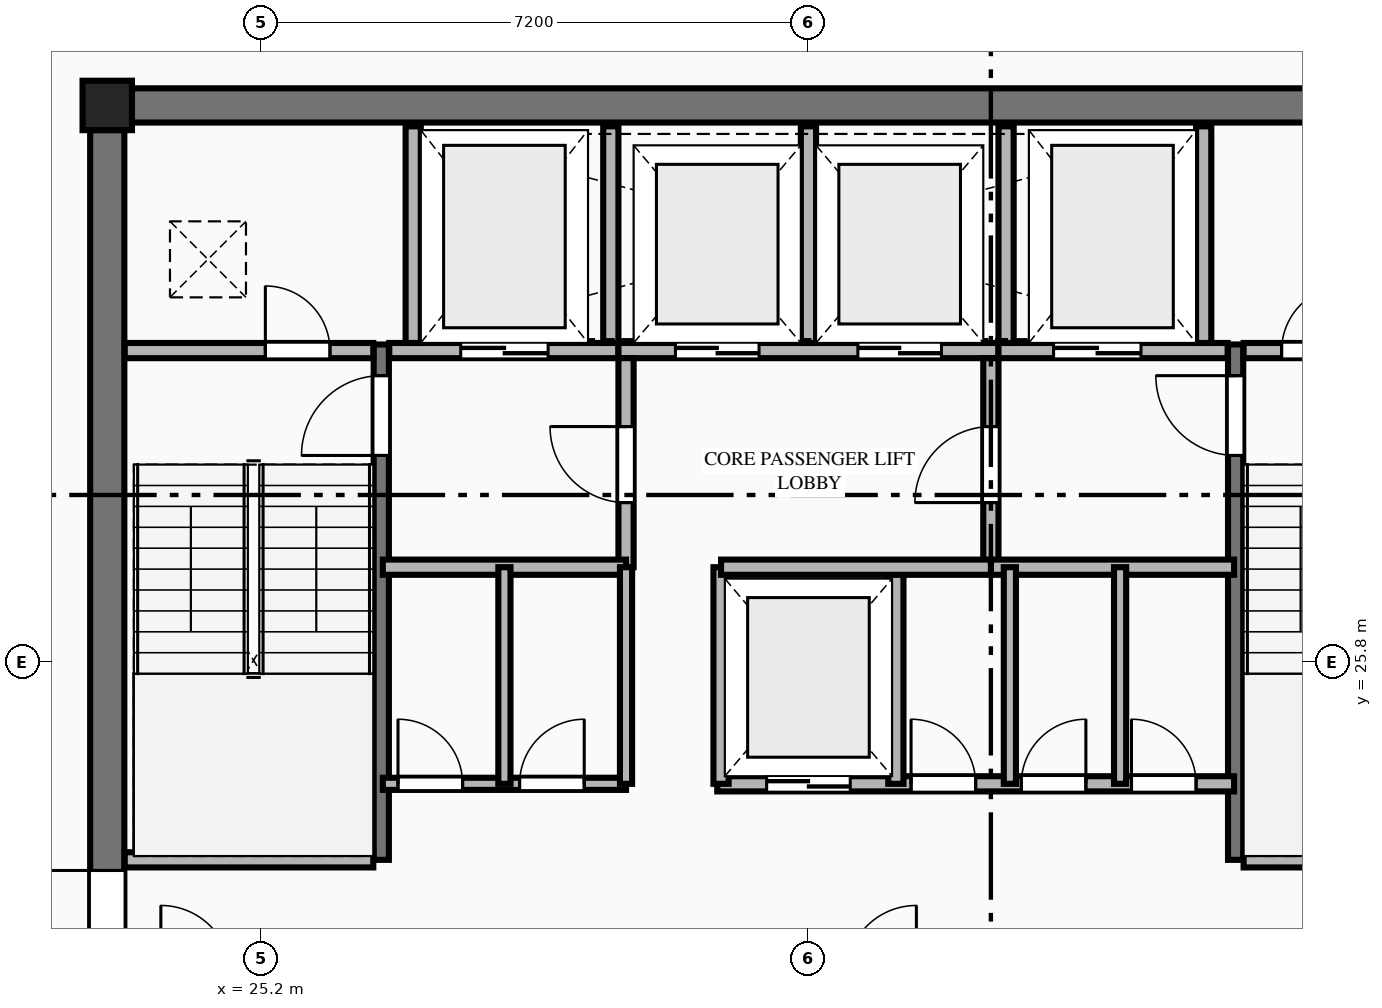
"""IFC4 building model, lengths in metres.
Left out: names, types, materials, properties, quantities, classifications, styles, units other than length and angle.
Written with IfcOpenShell. Run it as: python <this file> out.ifc"""

import sys

from ifc_helpers import new_model, si_unit, direction, frame, frame_2d, origin, origin_2d, place, context, subcontext, project, spatial, rectangle, extrude, element, fill, save


model = new_model("IFC4")
c1 = context("Model", 3, precision=1e-05, world=origin(), true_north=direction((0.0, 1.0)))
c2 = subcontext(c1, "Body", "Model", "MODEL_VIEW")
j1 = project(units=[si_unit("LENGTHUNIT", "METRE"), si_unit("PLANEANGLEUNIT", "RADIAN")], contexts=[c1])
p1 = place(None, origin())
s1 = spatial("IfcSite", under=j1, at=p1, CompositionType="ELEMENT")
p2 = place(p1, origin())
s2 = spatial("IfcBuilding", under=s1, at=p2, CompositionType="ELEMENT")
p3 = place(p2, frame((0.0, 0.0, 270.8)))
s3 = spatial("IfcBuildingStorey", under=s2, at=p3, CompositionType="ELEMENT", Elevation=270.8)
p4 = place(p3, frame((23.175, 33.125, 0.0), z_axis=(0.0, 0.0, 1.0), x_axis=(1.0, 0.0, 0.0)))
e1 = element("IfcColumn", 1, at=p4, inside=s3, PredefinedType="COLUMN", context=c2, shape_type="SweptSolid", body=[
    extrude(rectangle(XDim=0.65, YDim=0.65, at=origin_2d()), origin(), (0.0, 0.0, 1.0), 3.65),
])
p5 = place(p3, frame((23.5, 33.125, 0.0), z_axis=(0.0, 0.0, 1.0), x_axis=(1.0, 0.0, 0.0)))
e2 = element("IfcWall", 2, at=p5, inside=s3, PredefinedType="SHEAR", context=c2, shape_type="SweptSolid", body=[
    extrude(rectangle(XDim=17.8, YDim=0.45, at=frame_2d((8.9, 0.0))), origin(), (0.0, 0.0, 1.0), 3.45),
])
p6 = place(p3, frame((23.175, 19.0, 0.0), z_axis=(0.0, 0.0, 1.0), x_axis=(0.0, 1.0, 0.0)))
e3 = element("IfcWall", 3, at=p6, inside=s3, PredefinedType="SHEAR", context=c2, shape_type="SweptSolid", body=[
    extrude(rectangle(XDim=13.8, YDim=0.45, at=frame_2d((6.9, 0.0))), origin(), (0.0, 0.0, 1.0), 3.45),
])
p7 = place(p6, frame((2.84, 0.0, 0.0)))
e4 = element("IfcOpeningElement", 4, at=p7, cuts=e3, PredefinedType="OPENING", context=c2, shape_type="SweptSolid", body=[
    extrude(rectangle(XDim=1.22, YDim=2.25, at=frame_2d((0.61, 1.125))), frame((0.0, 0.235, 0.0), z_axis=(0.0, -1.0, 0.0), x_axis=(1.0, 0.0, 0.0)), (0.0, 0.0, 1.0), 0.47),
])
p8 = place(p3, frame((26.78, 23.2, 0.0), z_axis=(0.0, 0.0, 1.0), x_axis=(0.0, 1.0, 0.0)))
e5 = element("IfcWall", 5, at=p8, inside=s3, PredefinedType="SHEAR", context=c2, shape_type="SweptSolid", body=[
    extrude(rectangle(XDim=6.78, YDim=0.2, at=frame_2d((3.39, 0.0))), origin(), (0.0, 0.0, 1.0), 3.65),
])
p9 = place(p8, frame((5.32, 0.0, 0.0)))
e6 = element("IfcOpeningElement", 6, at=p9, cuts=e5, PredefinedType="OPENING", context=c2, shape_type="SweptSolid", body=[
    extrude(rectangle(XDim=1.05, YDim=2.15, at=frame_2d((0.525, 1.075))), frame((0.0, 0.11, 0.0), z_axis=(0.0, -1.0, 0.0), x_axis=(1.0, 0.0, 0.0)), (0.0, 0.0, 1.0), 0.22),
])
p10 = place(p3, frame((23.405, 23.2, 0.0), z_axis=(0.0, 0.0, 1.0), x_axis=(1.0, 0.0, 0.0)))
e7 = element("IfcWall", 7, at=p10, inside=s3, PredefinedType="PLUMBINGWALL", context=c2, shape_type="SweptSolid", body=[
    extrude(rectangle(XDim=3.27, YDim=0.2, at=frame_2d((1.635, 0.0))), origin(), (0.0, 0.0, 1.0), 3.45),
])
p11 = place(p3, frame((38.02, 23.2, 0.0), z_axis=(0.0, 0.0, 1.0), x_axis=(0.0, 1.0, 0.0)))
e8 = element("IfcWall", 8, at=p11, inside=s3, PredefinedType="SHEAR", context=c2, shape_type="SweptSolid", body=[
    extrude(rectangle(XDim=6.78, YDim=0.2, at=frame_2d((3.39, 0.0))), origin(), (0.0, 0.0, 1.0), 3.65),
])
p12 = place(p11, frame((5.32, 0.0, 0.0)))
e9 = element("IfcOpeningElement", 9, at=p12, cuts=e8, PredefinedType="OPENING", context=c2, shape_type="SweptSolid", body=[
    extrude(rectangle(XDim=1.05, YDim=2.15, at=frame_2d((0.525, 1.075))), frame((0.0, 0.11, 0.0), z_axis=(0.0, -1.0, 0.0), x_axis=(1.0, 0.0, 0.0)), (0.0, 0.0, 1.0), 0.22),
])
p13 = place(p3, frame((38.125, 23.2, 0.0), z_axis=(0.0, 0.0, 1.0), x_axis=(1.0, 0.0, 0.0)))
e10 = element("IfcWall", 10, at=p13, inside=s3, PredefinedType="PLUMBINGWALL", context=c2, shape_type="SweptSolid", body=[
    extrude(rectangle(XDim=3.27, YDim=0.2, at=frame_2d((1.635, 0.0))), origin(), (0.0, 0.0, 1.0), 3.45),
])
p14 = place(p3, frame((23.405, 29.9, 0.0), z_axis=(0.0, 0.0, 1.0), x_axis=(1.0, 0.0, 0.0)))
e11 = element("IfcWall", 11, at=p14, inside=s3, PredefinedType="PLUMBINGWALL", context=c2, shape_type="SweptSolid", body=[
    extrude(rectangle(XDim=3.27, YDim=0.2, at=frame_2d((1.635, 0.0))), origin(), (0.0, 0.0, 1.0), 3.45),
])
p15 = place(p14, frame((1.85, 0.0, 0.0)))
e12 = element("IfcOpeningElement", 12, at=p15, cuts=e11, PredefinedType="OPENING", context=c2, shape_type="SweptSolid", body=[
    extrude(rectangle(XDim=0.85, YDim=2.05, at=frame_2d((0.425, 1.025))), frame((0.0, 0.11, 0.0), z_axis=(0.0, -1.0, 0.0), x_axis=(1.0, 0.0, 0.0)), (0.0, 0.0, 1.0), 0.22),
])
p16 = place(p3, frame((26.885, 29.9, 0.0), z_axis=(0.0, 0.0, 1.0), x_axis=(1.0, 0.0, 0.0)))
e13 = element("IfcWall", 13, at=p16, inside=s3, PredefinedType="PLUMBINGWALL", context=c2, shape_type="SweptSolid", body=[
    extrude(rectangle(XDim=3.015, YDim=0.2, at=frame_2d((1.507, 0.0))), origin(), (0.0, 0.0, 1.0), 3.45),
])
p17 = place(p16, frame((0.94, 0.0, 0.0)))
e14 = element("IfcOpeningElement", 14, at=p17, cuts=e13, PredefinedType="OPENING", context=c2, shape_type="SweptSolid", body=[
    extrude(rectangle(XDim=1.15, YDim=2.2, at=frame_2d((0.575, 1.1))), frame((0.0, 0.11, 0.0), z_axis=(0.0, -1.0, 0.0), x_axis=(1.0, 0.0, 0.0)), (0.0, 0.0, 1.0), 0.22),
])
p18 = place(p3, frame((29.9, 29.9, 0.0), z_axis=(0.0, 0.0, 1.0), x_axis=(1.0, 0.0, 0.0)))
e15 = element("IfcWall", 15, at=p18, inside=s3, PredefinedType="PLUMBINGWALL", context=c2, shape_type="SweptSolid", body=[
    extrude(rectangle(XDim=5.0, YDim=0.2, at=frame_2d((2.5, 0.0))), origin(), (0.0, 0.0, 1.0), 3.45),
])
p19 = place(p18, frame((0.75, 0.0, 0.0)))
e16 = element("IfcOpeningElement", 16, at=p19, cuts=e15, PredefinedType="OPENING", context=c2, shape_type="SweptSolid", body=[
    extrude(rectangle(XDim=1.1, YDim=2.2, at=frame_2d((0.55, 1.1))), frame((0.0, 0.11, 0.0), z_axis=(0.0, -1.0, 0.0), x_axis=(1.0, 0.0, 0.0)), (0.0, 0.0, 1.0), 0.22),
])
p20 = place(p18, frame((3.15, 0.0, 0.0)))
e17 = element("IfcOpeningElement", 17, at=p20, cuts=e15, PredefinedType="OPENING", context=c2, shape_type="SweptSolid", body=[
    extrude(rectangle(XDim=1.1, YDim=2.2, at=frame_2d((0.55, 1.1))), frame((0.0, 0.11, 0.0), z_axis=(0.0, -1.0, 0.0), x_axis=(1.0, 0.0, 0.0)), (0.0, 0.0, 1.0), 0.22),
])
p21 = place(p3, frame((34.9, 29.9, 0.0), z_axis=(0.0, 0.0, 1.0), x_axis=(1.0, 0.0, 0.0)))
e18 = element("IfcWall", 18, at=p21, inside=s3, PredefinedType="PLUMBINGWALL", context=c2, shape_type="SweptSolid", body=[
    extrude(rectangle(XDim=3.015, YDim=0.2, at=frame_2d((1.508, 0.0))), origin(), (0.0, 0.0, 1.0), 3.45),
])
p22 = place(p21, frame((0.725, 0.0, 0.0)))
e19 = element("IfcOpeningElement", 19, at=p22, cuts=e18, PredefinedType="OPENING", context=c2, shape_type="SweptSolid", body=[
    extrude(rectangle(XDim=1.15, YDim=2.2, at=frame_2d((0.575, 1.1))), frame((0.0, 0.11, 0.0), z_axis=(0.0, -1.0, 0.0), x_axis=(1.0, 0.0, 0.0)), (0.0, 0.0, 1.0), 0.22),
])
p23 = place(p3, frame((38.125, 29.9, 0.0), z_axis=(0.0, 0.0, 1.0), x_axis=(1.0, 0.0, 0.0)))
e20 = element("IfcWall", 20, at=p23, inside=s3, PredefinedType="PLUMBINGWALL", context=c2, shape_type="SweptSolid", body=[
    extrude(rectangle(XDim=3.27, YDim=0.2, at=frame_2d((1.635, 0.0))), origin(), (0.0, 0.0, 1.0), 3.45),
])
p24 = place(p23, frame((0.5, 0.0, 0.0)))
e21 = element("IfcOpeningElement", 21, at=p24, cuts=e20, PredefinedType="OPENING", context=c2, shape_type="SweptSolid", body=[
    extrude(rectangle(XDim=0.85, YDim=2.05, at=frame_2d((0.425, 1.025))), frame((0.0, 0.11, 0.0), z_axis=(0.0, -1.0, 0.0), x_axis=(1.0, 0.0, 0.0)), (0.0, 0.0, 1.0), 0.22),
])
for number, where, z_axis, x_axis in (
    (22, (27.2, 30.0, 0.0), (0.0, 0.0, 1.0), (0.0, 1.0, 0.0)),
    (23, (29.8, 30.0, 0.0), (0.0, 0.0, 1.0), (0.0, 1.0, 0.0)),
    (24, (32.4, 30.0, 0.0), (0.0, 0.0, 1.0), (0.0, 1.0, 0.0)),
    (25, (35.0, 30.0, 0.0), (0.0, 0.0, 1.0), (0.0, 1.0, 0.0)),
    (26, (37.6, 30.0, 0.0), (0.0, 0.0, 1.0), (0.0, 1.0, 0.0)),
):
    element("IfcWall", number, at=place(p3, frame(where, z_axis=z_axis, x_axis=x_axis)), inside=s3, PredefinedType="PLUMBINGWALL", context=c2, shape_type="SweptSolid", body=[
        extrude(rectangle(XDim=2.85, YDim=0.2, at=frame_2d((1.425, 0.0))), origin(), (0.0, 0.0, 1.0), 3.45),
    ])
p25 = place(p3, frame((30.0, 27.05, 0.0), z_axis=(0.0, 0.0, 1.0), x_axis=(0.0, 1.0, 0.0)))
e27 = element("IfcWall", 27, at=p25, inside=s3, PredefinedType="PLUMBINGWALL", context=c2, shape_type="SweptSolid", body=[
    extrude(rectangle(XDim=2.75, YDim=0.2, at=frame_2d((1.375, 0.0))), origin(), (0.0, 0.0, 1.0), 3.45),
])
p26 = place(p25, frame((0.85, 0.0, 0.0)))
e28 = element("IfcOpeningElement", 28, at=p26, cuts=e27, PredefinedType="OPENING", context=c2, shape_type="SweptSolid", body=[
    extrude(rectangle(XDim=1.0, YDim=2.15, at=frame_2d((0.5, 1.075))), frame((0.0, 0.11, 0.0), z_axis=(0.0, -1.0, 0.0), x_axis=(1.0, 0.0, 0.0)), (0.0, 0.0, 1.0), 0.22),
])
p27 = place(p3, frame((26.8, 27.05, 0.0), z_axis=(0.0, 0.0, 1.0), x_axis=(1.0, 0.0, 0.0)))
e29 = element("IfcWall", 29, at=p27, inside=s3, PredefinedType="PLUMBINGWALL", context=c2, shape_type="SweptSolid", body=[
    extrude(rectangle(XDim=3.2, YDim=0.2, at=frame_2d((1.6, 0.0))), origin(), (0.0, 0.0, 1.0), 3.45),
])
p28 = place(p3, frame((34.8, 27.05, 0.0), z_axis=(0.0, 0.0, 1.0), x_axis=(0.0, 1.0, 0.0)))
e30 = element("IfcWall", 30, at=p28, inside=s3, PredefinedType="PLUMBINGWALL", context=c2, shape_type="SweptSolid", body=[
    extrude(rectangle(XDim=2.75, YDim=0.2, at=frame_2d((1.375, 0.0))), origin(), (0.0, 0.0, 1.0), 3.45),
])
p29 = place(p28, frame((0.85, 0.0, 0.0)))
e31 = element("IfcOpeningElement", 31, at=p29, cuts=e30, PredefinedType="OPENING", context=c2, shape_type="SweptSolid", body=[
    extrude(rectangle(XDim=1.0, YDim=2.15, at=frame_2d((0.5, 1.075))), frame((0.0, 0.11, 0.0), z_axis=(0.0, -1.0, 0.0), x_axis=(1.0, 0.0, 0.0)), (0.0, 0.0, 1.0), 0.22),
])
p30 = place(p3, frame((34.8, 27.05, 0.0), z_axis=(0.0, 0.0, 1.0), x_axis=(1.0, 0.0, 0.0)))
e32 = element("IfcWall", 32, at=p30, inside=s3, PredefinedType="PLUMBINGWALL", context=c2, shape_type="SweptSolid", body=[
    extrude(rectangle(XDim=3.2, YDim=0.2, at=frame_2d((1.6, 0.0))), origin(), (0.0, 0.0, 1.0), 3.45),
])
p31 = place(p3, frame((26.8, 24.2, 0.0), z_axis=(0.0, 0.0, 1.0), x_axis=(1.0, 0.0, 0.0)))
e33 = element("IfcWall", 33, at=p31, inside=s3, PredefinedType="PARTITIONING", context=c2, shape_type="SweptSolid", body=[
    extrude(rectangle(XDim=3.2, YDim=0.16, at=frame_2d((1.6, 0.0))), origin(), (0.0, 0.0, 1.0), 3.45),
])
p32 = place(p31, frame((0.2, 0.0, 0.0)))
e34 = element("IfcOpeningElement", 34, at=p32, cuts=e33, PredefinedType="OPENING", context=c2, shape_type="SweptSolid", body=[
    extrude(rectangle(XDim=0.85, YDim=2.05, at=frame_2d((0.425, 1.025))), frame((0.0, 0.09, 0.0), z_axis=(0.0, -1.0, 0.0), x_axis=(1.0, 0.0, 0.0)), (0.0, 0.0, 1.0), 0.18),
])
p33 = place(p31, frame((1.8, 0.0, 0.0)))
e35 = element("IfcOpeningElement", 35, at=p33, cuts=e33, PredefinedType="OPENING", context=c2, shape_type="SweptSolid", body=[
    extrude(rectangle(XDim=0.85, YDim=2.05, at=frame_2d((0.425, 1.025))), frame((0.0, 0.09, 0.0), z_axis=(0.0, -1.0, 0.0), x_axis=(1.0, 0.0, 0.0)), (0.0, 0.0, 1.0), 0.18),
])
p34 = place(p3, frame((30.0, 24.2, 0.0), z_axis=(0.0, 0.0, 1.0), x_axis=(0.0, 1.0, 0.0)))
e36 = element("IfcWall", 36, at=p34, inside=s3, PredefinedType="PARTITIONING", context=c2, shape_type="SweptSolid", body=[
    extrude(rectangle(XDim=2.85, YDim=0.16, at=frame_2d((1.425, 0.0))), origin(), (0.0, 0.0, 1.0), 3.45),
])
p35 = place(p3, frame((31.2, 24.2, 0.0), z_axis=(0.0, 0.0, 1.0), x_axis=(1.0, 0.0, 0.0)))
e37 = element("IfcWall", 37, at=p35, inside=s3, PredefinedType="PLUMBINGWALL", context=c2, shape_type="SweptSolid", body=[
    extrude(rectangle(XDim=6.8, YDim=0.2, at=frame_2d((3.4, 0.0))), origin(), (0.0, 0.0, 1.0), 3.45),
])
p36 = place(p35, frame((0.65, 0.0, 0.0)))
e38 = element("IfcOpeningElement", 38, at=p36, cuts=e37, PredefinedType="OPENING", context=c2, shape_type="SweptSolid", body=[
    extrude(rectangle(XDim=1.1, YDim=2.2, at=frame_2d((0.55, 1.1))), frame((0.0, 0.11, 0.0), z_axis=(0.0, -1.0, 0.0), x_axis=(1.0, 0.0, 0.0)), (0.0, 0.0, 1.0), 0.22),
])
p37 = place(p35, frame((2.55, 0.0, 0.0)))
e39 = element("IfcOpeningElement", 39, at=p37, cuts=e37, PredefinedType="OPENING", context=c2, shape_type="SweptSolid", body=[
    extrude(rectangle(XDim=0.85, YDim=2.05, at=frame_2d((0.425, 1.025))), frame((0.0, 0.11, 0.0), z_axis=(0.0, -1.0, 0.0), x_axis=(1.0, 0.0, 0.0)), (0.0, 0.0, 1.0), 0.22),
])
p38 = place(p35, frame((4.0, 0.0, 0.0)))
e40 = element("IfcOpeningElement", 40, at=p38, cuts=e37, PredefinedType="OPENING", context=c2, shape_type="SweptSolid", body=[
    extrude(rectangle(XDim=0.85, YDim=2.05, at=frame_2d((0.425, 1.025))), frame((0.0, 0.11, 0.0), z_axis=(0.0, -1.0, 0.0), x_axis=(1.0, 0.0, 0.0)), (0.0, 0.0, 1.0), 0.22),
])
p39 = place(p35, frame((5.45, 0.0, 0.0)))
e41 = element("IfcOpeningElement", 41, at=p39, cuts=e37, PredefinedType="OPENING", context=c2, shape_type="SweptSolid", body=[
    extrude(rectangle(XDim=0.85, YDim=2.05, at=frame_2d((0.425, 1.025))), frame((0.0, 0.11, 0.0), z_axis=(0.0, -1.0, 0.0), x_axis=(1.0, 0.0, 0.0)), (0.0, 0.0, 1.0), 0.22),
])
for number, where, z_axis, x_axis in (
    (42, (31.25, 24.2, 0.0), (0.0, 0.0, 1.0), (0.0, 1.0, 0.0)),
    (43, (33.55, 24.2, 0.0), (0.0, 0.0, 1.0), (0.0, 1.0, 0.0)),
):
    element("IfcWall", number, at=place(p3, frame(where, z_axis=z_axis, x_axis=x_axis)), inside=s3, PredefinedType="PLUMBINGWALL", context=c2, shape_type="SweptSolid", body=[
        extrude(rectangle(XDim=2.85, YDim=0.2, at=frame_2d((1.425, 0.0))), origin(), (0.0, 0.0, 1.0), 3.45),
    ])
p40 = place(p3, frame((31.25, 27.05, 0.0), z_axis=(0.0, 0.0, 1.0), x_axis=(1.0, 0.0, 0.0)))
e44 = element("IfcWall", 44, at=p40, inside=s3, PredefinedType="PLUMBINGWALL", context=c2, shape_type="SweptSolid", body=[
    extrude(rectangle(XDim=3.55, YDim=0.2, at=frame_2d((1.775, 0.0))), origin(), (0.0, 0.0, 1.0), 3.45),
])
for number, where, z_axis, x_axis in (
    (45, (28.4, 24.2, 0.0), (0.0, 0.0, 1.0), (0.0, 1.0, 0.0)),
    (46, (35.05, 24.2, 0.0), (0.0, 0.0, 1.0), (0.0, 1.0, 0.0)),
    (47, (36.5, 24.2, 0.0), (0.0, 0.0, 1.0), (0.0, 1.0, 0.0)),
):
    element("IfcWall", number, at=place(p3, frame(where, z_axis=z_axis, x_axis=x_axis)), inside=s3, PredefinedType="PARTITIONING", context=c2, shape_type="SweptSolid", body=[
        extrude(rectangle(XDim=2.85, YDim=0.16, at=frame_2d((1.425, 0.0))), origin(), (0.0, 0.0, 1.0), 3.45),
    ])
p41 = place(p7, origin())
e48 = element("IfcDoor", 48, at=p41, inside=s3, OperationType="SINGLE_SWING_RIGHT", PredefinedType="DOOR", context=c2, shape_type="SweptSolid", body=[
    extrude(rectangle(XDim=1.22, YDim=2.25, at=frame_2d((0.61, 1.125))), frame((0.0, 0.025, 0.0), z_axis=(0.0, -1.0, 0.0), x_axis=(1.0, 0.0, 0.0)), (0.0, 0.0, 1.0), 0.05),
])
fill(e4, e48)
p42 = place(p9, origin())
e49 = element("IfcDoor", 49, at=p42, inside=s3, OperationType="SINGLE_SWING_LEFT", PredefinedType="DOOR", context=c2, shape_type="SweptSolid", body=[
    extrude(rectangle(XDim=1.05, YDim=2.15, at=frame_2d((0.525, 1.075))), frame((0.0, 0.025, 0.0), z_axis=(0.0, -1.0, 0.0), x_axis=(1.0, 0.0, 0.0)), (0.0, 0.0, 1.0), 0.05),
])
fill(e6, e49)
p43 = place(p12, origin())
e50 = element("IfcDoor", 50, at=p43, inside=s3, OperationType="SINGLE_SWING_RIGHT", PredefinedType="DOOR", context=c2, shape_type="SweptSolid", body=[
    extrude(rectangle(XDim=1.05, YDim=2.15, at=frame_2d((0.525, 1.075))), frame((0.0, 0.025, 0.0), z_axis=(0.0, -1.0, 0.0), x_axis=(1.0, 0.0, 0.0)), (0.0, 0.0, 1.0), 0.05),
])
fill(e9, e50)
p44 = place(p15, origin())
e51 = element("IfcDoor", 51, at=p44, inside=s3, OperationType="SINGLE_SWING_LEFT", PredefinedType="DOOR", context=c2, shape_type="SweptSolid", body=[
    extrude(rectangle(XDim=0.85, YDim=2.05, at=frame_2d((0.425, 1.025))), frame((0.0, 0.025, 0.0), z_axis=(0.0, -1.0, 0.0), x_axis=(1.0, 0.0, 0.0)), (0.0, 0.0, 1.0), 0.05),
])
fill(e12, e51)
p45 = place(p24, origin())
e52 = element("IfcDoor", 52, at=p45, inside=s3, OperationType="SINGLE_SWING_RIGHT", PredefinedType="DOOR", context=c2, shape_type="SweptSolid", body=[
    extrude(rectangle(XDim=0.85, YDim=2.05, at=frame_2d((0.425, 1.025))), frame((0.0, 0.025, 0.0), z_axis=(0.0, -1.0, 0.0), x_axis=(1.0, 0.0, 0.0)), (0.0, 0.0, 1.0), 0.05),
])
fill(e21, e52)
p46 = place(p17, origin())
e53 = element("IfcDoor", 53, at=p46, inside=s3, OperationType="DOUBLE_DOOR_SLIDING", PredefinedType="DOOR", context=c2, shape_type="SweptSolid", body=[
    extrude(rectangle(XDim=1.15, YDim=2.2, at=frame_2d((0.575, 1.1))), frame((0.0, 0.025, 0.0), z_axis=(0.0, -1.0, 0.0), x_axis=(1.0, 0.0, 0.0)), (0.0, 0.0, 1.0), 0.05),
])
fill(e14, e53)
p47 = place(p22, origin())
e54 = element("IfcDoor", 54, at=p47, inside=s3, OperationType="DOUBLE_DOOR_SLIDING", PredefinedType="DOOR", context=c2, shape_type="SweptSolid", body=[
    extrude(rectangle(XDim=1.15, YDim=2.2, at=frame_2d((0.575, 1.1))), frame((0.0, 0.025, 0.0), z_axis=(0.0, -1.0, 0.0), x_axis=(1.0, 0.0, 0.0)), (0.0, 0.0, 1.0), 0.05),
])
fill(e19, e54)
p48 = place(p19, origin())
e55 = element("IfcDoor", 55, at=p48, inside=s3, OperationType="DOUBLE_DOOR_SLIDING", PredefinedType="DOOR", context=c2, shape_type="SweptSolid", body=[
    extrude(rectangle(XDim=1.1, YDim=2.2, at=frame_2d((0.55, 1.1))), frame((0.0, 0.025, 0.0), z_axis=(0.0, -1.0, 0.0), x_axis=(1.0, 0.0, 0.0)), (0.0, 0.0, 1.0), 0.05),
])
fill(e16, e55)
p49 = place(p20, origin())
e56 = element("IfcDoor", 56, at=p49, inside=s3, OperationType="DOUBLE_DOOR_SLIDING", PredefinedType="DOOR", context=c2, shape_type="SweptSolid", body=[
    extrude(rectangle(XDim=1.1, YDim=2.2, at=frame_2d((0.55, 1.1))), frame((0.0, 0.025, 0.0), z_axis=(0.0, -1.0, 0.0), x_axis=(1.0, 0.0, 0.0)), (0.0, 0.0, 1.0), 0.05),
])
fill(e17, e56)
p50 = place(p26, origin())
e57 = element("IfcDoor", 57, at=p50, inside=s3, OperationType="SINGLE_SWING_RIGHT", PredefinedType="DOOR", context=c2, shape_type="SweptSolid", body=[
    extrude(rectangle(XDim=1.0, YDim=2.15, at=frame_2d((0.5, 1.075))), frame((0.0, 0.025, 0.0), z_axis=(0.0, -1.0, 0.0), x_axis=(1.0, 0.0, 0.0)), (0.0, 0.0, 1.0), 0.05),
])
fill(e28, e57)
p51 = place(p29, origin())
e58 = element("IfcDoor", 58, at=p51, inside=s3, OperationType="SINGLE_SWING_LEFT", PredefinedType="DOOR", context=c2, shape_type="SweptSolid", body=[
    extrude(rectangle(XDim=1.0, YDim=2.15, at=frame_2d((0.5, 1.075))), frame((0.0, 0.025, 0.0), z_axis=(0.0, -1.0, 0.0), x_axis=(1.0, 0.0, 0.0)), (0.0, 0.0, 1.0), 0.05),
])
fill(e31, e58)
p52 = place(p36, origin())
e59 = element("IfcDoor", 59, at=p52, inside=s3, OperationType="DOUBLE_DOOR_SLIDING", PredefinedType="DOOR", context=c2, shape_type="SweptSolid", body=[
    extrude(rectangle(XDim=1.1, YDim=2.2, at=frame_2d((0.55, 1.1))), frame((0.0, 0.025, 0.0), z_axis=(0.0, -1.0, 0.0), x_axis=(1.0, 0.0, 0.0)), (0.0, 0.0, 1.0), 0.05),
])
fill(e38, e59)
p53 = place(p32, origin())
e60 = element("IfcDoor", 60, at=p53, inside=s3, OperationType="SINGLE_SWING_LEFT", PredefinedType="DOOR", context=c2, shape_type="SweptSolid", body=[
    extrude(rectangle(XDim=0.85, YDim=2.05, at=frame_2d((0.425, 1.025))), frame((0.0, 0.025, 0.0), z_axis=(0.0, -1.0, 0.0), x_axis=(1.0, 0.0, 0.0)), (0.0, 0.0, 1.0), 0.05),
])
fill(e34, e60)
p54 = place(p33, origin())
e61 = element("IfcDoor", 61, at=p54, inside=s3, OperationType="SINGLE_SWING_RIGHT", PredefinedType="DOOR", context=c2, shape_type="SweptSolid", body=[
    extrude(rectangle(XDim=0.85, YDim=2.05, at=frame_2d((0.425, 1.025))), frame((0.0, 0.025, 0.0), z_axis=(0.0, -1.0, 0.0), x_axis=(1.0, 0.0, 0.0)), (0.0, 0.0, 1.0), 0.05),
])
fill(e35, e61)
p55 = place(p37, origin())
e62 = element("IfcDoor", 62, at=p55, inside=s3, OperationType="SINGLE_SWING_LEFT", PredefinedType="DOOR", context=c2, shape_type="SweptSolid", body=[
    extrude(rectangle(XDim=0.85, YDim=2.05, at=frame_2d((0.425, 1.025))), frame((0.0, 0.025, 0.0), z_axis=(0.0, -1.0, 0.0), x_axis=(1.0, 0.0, 0.0)), (0.0, 0.0, 1.0), 0.05),
])
fill(e39, e62)
p56 = place(p38, origin())
e63 = element("IfcDoor", 63, at=p56, inside=s3, OperationType="SINGLE_SWING_RIGHT", PredefinedType="DOOR", context=c2, shape_type="SweptSolid", body=[
    extrude(rectangle(XDim=0.85, YDim=2.05, at=frame_2d((0.425, 1.025))), frame((0.0, 0.025, 0.0), z_axis=(0.0, -1.0, 0.0), x_axis=(1.0, 0.0, 0.0)), (0.0, 0.0, 1.0), 0.05),
])
fill(e40, e63)
p57 = place(p39, origin())
e64 = element("IfcDoor", 64, at=p57, inside=s3, OperationType="SINGLE_SWING_LEFT", PredefinedType="DOOR", context=c2, shape_type="SweptSolid", body=[
    extrude(rectangle(XDim=0.85, YDim=2.05, at=frame_2d((0.425, 1.025))), frame((0.0, 0.025, 0.0), z_axis=(0.0, -1.0, 0.0), x_axis=(1.0, 0.0, 0.0)), (0.0, 0.0, 1.0), 0.05),
])
fill(e41, e64)
save(model, sys.argv[1])
